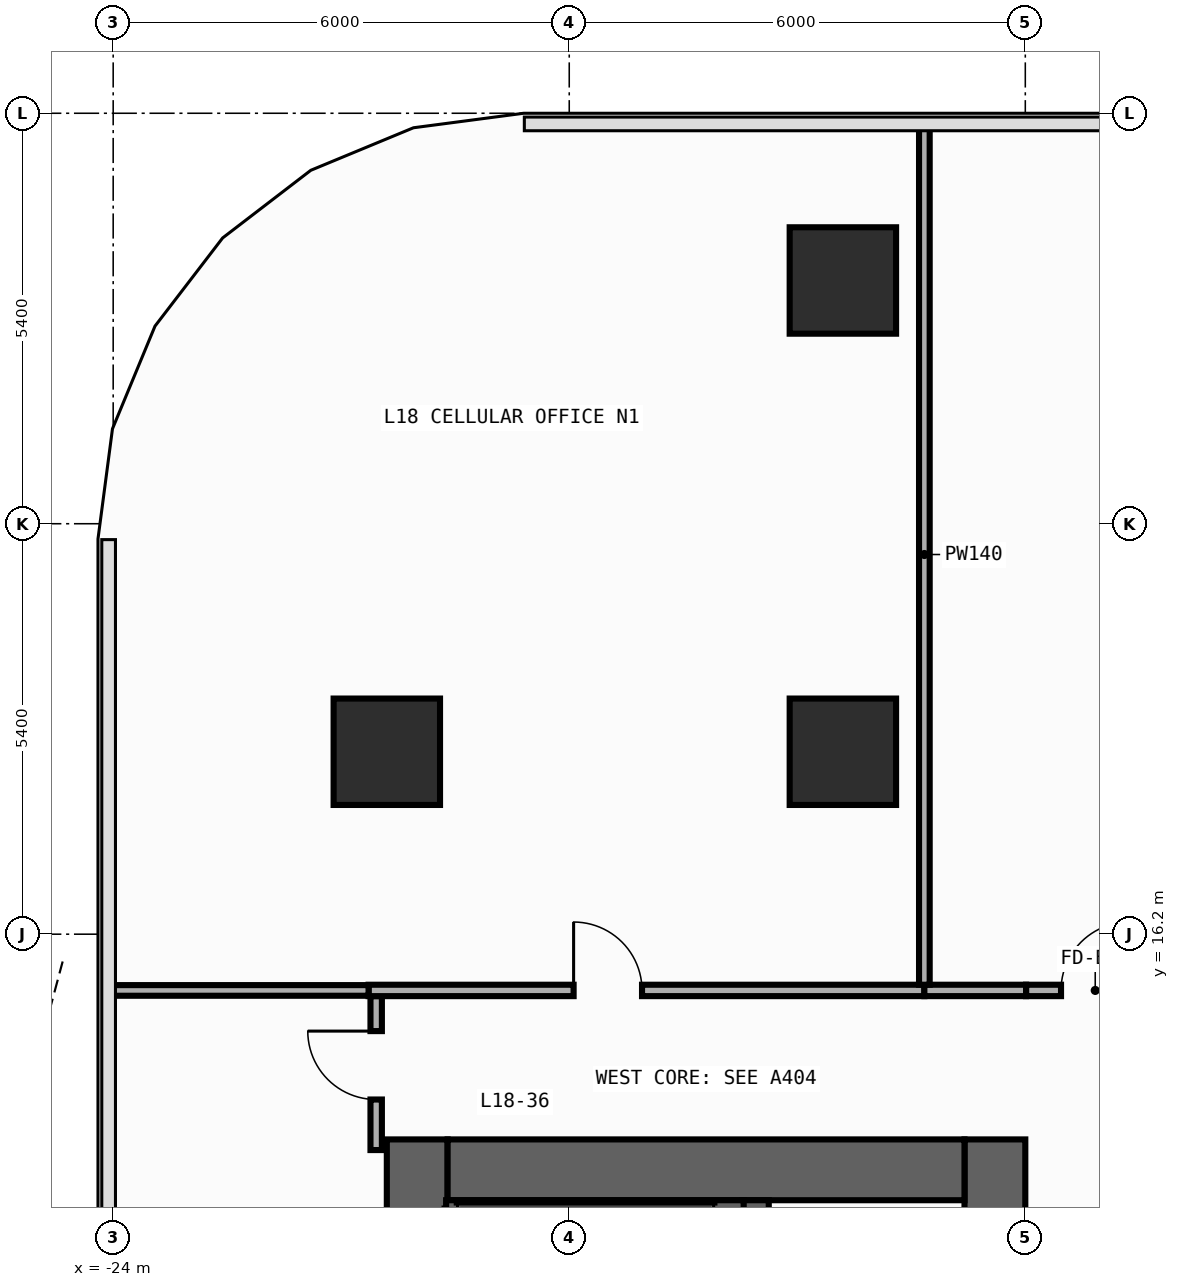
"""IFC4 building model, lengths in metres.
Left out: names, types, materials, properties, quantities, classifications, styles, units other than length and angle.
Written with IfcOpenShell. Run it as: python <this file> out.ifc"""

import sys

from ifc_helpers import new_model, si_unit, direction, frame, frame_2d, origin, origin_2d, place, context, subcontext, project, spatial, rectangle, extrude, element, fill, save


model = new_model("IFC4")
c1 = context("Model", 3, precision=1e-05, world=origin(), true_north=direction((0.0, 1.0)))
c2 = subcontext(c1, "Body", "Model", "MODEL_VIEW")
j1 = project(units=[si_unit("LENGTHUNIT", "METRE"), si_unit("PLANEANGLEUNIT", "RADIAN")], contexts=[c1])
p1 = place(None, origin())
s1 = spatial("IfcSite", under=j1, at=p1, CompositionType="ELEMENT")
p2 = place(p1, origin())
s2 = spatial("IfcBuilding", under=s1, at=p2, CompositionType="ELEMENT")
p3 = place(p2, frame((0.0, 0.0, 76.4)))
s3 = spatial("IfcBuildingStorey", under=s2, at=p3, CompositionType="ELEMENT", Elevation=76.4)
p4 = place(p3, frame((-20.0, -13.5, 0.0), z_axis=(0.0, 0.0, 1.0), x_axis=(0.0, 1.0, 0.0)))
e1 = element("IfcWall", 1, at=p4, inside=s3, PredefinedType="SHEAR", context=c2, shape_type="SweptSolid", body=[
    extrude(rectangle(XDim=27.0, YDim=0.8, at=frame_2d((13.5, 0.0))), origin(), (0.0, 0.0, 1.0), 3.94),
])
p5 = place(p3, frame((-12.4, -13.5, 0.0), z_axis=(0.0, 0.0, 1.0), x_axis=(0.0, 1.0, 0.0)))
e2 = element("IfcWall", 2, at=p5, inside=s3, PredefinedType="SHEAR", context=c2, shape_type="SweptSolid", body=[
    extrude(rectangle(XDim=27.0, YDim=0.8, at=frame_2d((13.5, 0.0))), origin(), (0.0, 0.0, 1.0), 3.94),
])
p6 = place(p5, frame((21.55, 0.0, 0.0)))
e3 = element("IfcOpeningElement", 3, at=p6, cuts=e2, PredefinedType="OPENING", context=c2, shape_type="SweptSolid", body=[
    extrude(rectangle(XDim=1.1, YDim=2.2, at=frame_2d((0.55, 1.1))), frame((0.0, 0.41, 0.0), z_axis=(0.0, -1.0, 0.0), x_axis=(1.0, 0.0, 0.0)), (0.0, 0.0, 1.0), 0.82),
])
p7 = place(p5, frame((18.35, 0.0, 0.0)))
e4 = element("IfcOpeningElement", 4, at=p7, cuts=e2, PredefinedType="OPENING", context=c2, shape_type="SweptSolid", body=[
    extrude(rectangle(XDim=1.1, YDim=2.2, at=frame_2d((0.55, 1.1))), frame((0.0, 0.41, 0.0), z_axis=(0.0, -1.0, 0.0), x_axis=(1.0, 0.0, 0.0)), (0.0, 0.0, 1.0), 0.82),
])
p8 = place(p5, frame((15.15, 0.0, 0.0)))
e5 = element("IfcOpeningElement", 5, at=p8, cuts=e2, PredefinedType="OPENING", context=c2, shape_type="SweptSolid", body=[
    extrude(rectangle(XDim=1.1, YDim=2.2, at=frame_2d((0.55, 1.1))), frame((0.0, 0.41, 0.0), z_axis=(0.0, -1.0, 0.0), x_axis=(1.0, 0.0, 0.0)), (0.0, 0.0, 1.0), 0.82),
])
p9 = place(p5, frame((10.35, 0.0, 0.0)))
e6 = element("IfcOpeningElement", 6, at=p9, cuts=e2, PredefinedType="OPENING", context=c2, shape_type="SweptSolid", body=[
    extrude(rectangle(XDim=1.1, YDim=2.2, at=frame_2d((0.55, 1.1))), frame((0.0, 0.41, 0.0), z_axis=(0.0, -1.0, 0.0), x_axis=(1.0, 0.0, 0.0)), (0.0, 0.0, 1.0), 0.82),
])
p10 = place(p5, frame((7.15, 0.0, 0.0)))
e7 = element("IfcOpeningElement", 7, at=p10, cuts=e2, PredefinedType="OPENING", context=c2, shape_type="SweptSolid", body=[
    extrude(rectangle(XDim=1.1, YDim=2.2, at=frame_2d((0.55, 1.1))), frame((0.0, 0.41, 0.0), z_axis=(0.0, -1.0, 0.0), x_axis=(1.0, 0.0, 0.0)), (0.0, 0.0, 1.0), 0.82),
])
p11 = place(p5, frame((3.95, 0.0, 0.0)))
e8 = element("IfcOpeningElement", 8, at=p11, cuts=e2, PredefinedType="OPENING", context=c2, shape_type="SweptSolid", body=[
    extrude(rectangle(XDim=1.1, YDim=2.2, at=frame_2d((0.55, 1.1))), frame((0.0, 0.41, 0.0), z_axis=(0.0, -1.0, 0.0), x_axis=(1.0, 0.0, 0.0)), (0.0, 0.0, 1.0), 0.82),
])
p12 = place(p5, frame((12.725, 0.0, 0.0)))
e9 = element("IfcOpeningElement", 9, at=p12, cuts=e2, PredefinedType="OPENING", context=c2, shape_type="SweptSolid", body=[
    extrude(rectangle(XDim=1.15, YDim=2.2, at=frame_2d((0.575, 1.1))), frame((0.0, 0.41, 0.0), z_axis=(0.0, -1.0, 0.0), x_axis=(1.0, 0.0, 0.0)), (0.0, 0.0, 1.0), 0.82),
])
p13 = place(p5, frame((1.625, 0.0, 0.0)))
e10 = element("IfcOpeningElement", 10, at=p13, cuts=e2, PredefinedType="OPENING", context=c2, shape_type="SweptSolid", body=[
    extrude(rectangle(XDim=0.85, YDim=2.1, at=frame_2d((0.425, 1.05))), frame((0.0, 0.41, 0.0), z_axis=(0.0, -1.0, 0.0), x_axis=(1.0, 0.0, 0.0)), (0.0, 0.0, 1.0), 0.82),
])
p14 = place(p3, frame((-19.6, 13.1, 0.0), z_axis=(0.0, 0.0, 1.0), x_axis=(1.0, 0.0, 0.0)))
e11 = element("IfcWall", 11, at=p14, inside=s3, PredefinedType="SHEAR", context=c2, shape_type="SweptSolid", body=[
    extrude(rectangle(XDim=6.8, YDim=0.8, at=frame_2d((3.4, 0.0))), origin(), (0.0, 0.0, 1.0), 3.94),
])
p15 = place(p3, frame((-15.55, -12.7, 0.0), z_axis=(0.0, 0.0, 1.0), x_axis=(0.0, 1.0, 0.0)))
e12 = element("IfcWall", 12, at=p15, inside=s3, PredefinedType="SHEAR", context=c2, shape_type="SweptSolid", body=[
    extrude(rectangle(XDim=25.4, YDim=0.35, at=frame_2d((12.7, 0.0))), origin(), (0.0, 0.0, 1.0), 3.94),
])
p16 = place(p15, frame((11.925, 0.0, 0.0)))
e13 = element("IfcOpeningElement", 13, at=p16, cuts=e12, PredefinedType="OPENING", context=c2, shape_type="SweptSolid", body=[
    extrude(rectangle(XDim=1.15, YDim=2.2, at=frame_2d((0.575, 1.1))), frame((0.0, 0.185, 0.0), z_axis=(0.0, -1.0, 0.0), x_axis=(1.0, 0.0, 0.0)), (0.0, 0.0, 1.0), 0.37),
])
p17 = place(p15, frame((0.825, 0.0, 0.0)))
e14 = element("IfcOpeningElement", 14, at=p17, cuts=e12, PredefinedType="OPENING", context=c2, shape_type="SweptSolid", body=[
    extrude(rectangle(XDim=0.85, YDim=2.1, at=frame_2d((0.425, 1.05))), frame((0.0, 0.185, 0.0), z_axis=(0.0, -1.0, 0.0), x_axis=(1.0, 0.0, 0.0)), (0.0, 0.0, 1.0), 0.37),
])
p18 = place(p3, frame((-19.62, 12.59, 0.0), z_axis=(0.0, 0.0, 1.0), x_axis=(1.0, 0.0, 0.0)))
e15 = element("IfcWall", 15, at=p18, inside=s3, PredefinedType="SHEAR", context=c2, shape_type="SweptSolid", body=[
    extrude(rectangle(XDim=3.915, YDim=0.22, at=frame_2d((1.958, 0.0))), origin(), (0.0, 0.0, 1.0), 3.94),
])
for number, where, z_axis, x_axis in (
    (16, (-20.4, 18.6, 0.0), (0.0, 0.0, 1.0), (1.0, 0.0, 0.0)),
    (17, (-14.4, 18.6, 0.0), (0.0, 0.0, 1.0), (1.0, 0.0, 0.0)),
    (18, (-14.4, 24.8, 0.0), (0.0, 0.0, 1.0), (1.0, 0.0, 0.0)),
):
    element("IfcColumn", number, at=place(p3, frame(where, z_axis=z_axis, x_axis=x_axis)), inside=s3, PredefinedType="COLUMN", context=c2, shape_type="SweptSolid", body=[
        extrude(rectangle(XDim=1.4, YDim=1.4, at=origin_2d()), origin(), (0.0, 0.0, 1.0), 4.2),
    ])
p19 = place(p3, frame((-11.99, 15.46, 0.0), z_axis=(0.0, 0.0, 1.0), x_axis=(1.0, 0.0, 0.0)))
e19 = element("IfcWall", 19, at=p19, inside=s3, PredefinedType="PARTITIONING", context=c2, shape_type="SweptSolid", body=[
    extrude(rectangle(XDim=1.98, YDim=0.15, at=frame_2d((0.99, 0.0))), origin(), (0.0, 0.0, 1.0), 3.94),
])
p20 = place(p19, frame((0.46, 0.0, 0.0)))
e20 = element("IfcOpeningElement", 20, at=p20, cuts=e19, PredefinedType="OPENING", context=c2, shape_type="SweptSolid", body=[
    extrude(rectangle(XDim=0.9, YDim=2.15, at=frame_2d((0.45, 1.075))), frame((0.0, 0.085, 0.0), z_axis=(0.0, -1.0, 0.0), x_axis=(1.0, 0.0, 0.0)), (0.0, 0.0, 1.0), 0.17),
])
p21 = place(p3, frame((-20.54, 13.36, 0.0), z_axis=(0.0, 0.0, 1.0), x_axis=(0.0, 1.0, 0.0)))
e21 = element("IfcWall", 21, at=p21, inside=s3, PredefinedType="PARTITIONING", context=c2, shape_type="SweptSolid", body=[
    extrude(rectangle(XDim=2.025, YDim=0.15, at=frame_2d((1.012, 0.0))), origin(), (0.0, 0.0, 1.0), 3.94),
])
p22 = place(p21, frame((0.665, 0.0, 0.0)))
e22 = element("IfcOpeningElement", 22, at=p22, cuts=e21, PredefinedType="OPENING", context=c2, shape_type="SweptSolid", body=[
    extrude(rectangle(XDim=0.9, YDim=2.15, at=frame_2d((0.45, 1.075))), frame((0.0, 0.085, 0.0), z_axis=(0.0, -1.0, 0.0), x_axis=(1.0, 0.0, 0.0)), (0.0, 0.0, 1.0), 0.17),
])
p23 = place(p3, frame((-20.64, 15.46, 0.0), z_axis=(0.0, 0.0, 1.0), x_axis=(1.0, 0.0, 0.0)))
e23 = element("IfcWall", 23, at=p23, inside=s3, PredefinedType="PARTITIONING", context=c2, shape_type="SweptSolid", body=[
    extrude(rectangle(XDim=7.312, YDim=0.15, at=frame_2d((3.656, 0.0))), origin(), (0.0, 0.0, 1.0), 3.94),
])
p24 = place(p23, frame((2.698, 0.0, 0.0)))
e24 = element("IfcOpeningElement", 24, at=p24, cuts=e23, PredefinedType="OPENING", context=c2, shape_type="SweptSolid", body=[
    extrude(rectangle(XDim=0.9, YDim=2.15, at=frame_2d((0.45, 1.075))), frame((0.0, 0.085, 0.0), z_axis=(0.0, -1.0, 0.0), x_axis=(1.0, 0.0, 0.0)), (0.0, 0.0, 1.0), 0.17),
])
p25 = place(p3, frame((-13.328, 15.46, 0.0), z_axis=(0.0, 0.0, 1.0), x_axis=(1.0, 0.0, 0.0)))
e25 = element("IfcWall", 25, at=p25, inside=s3, PredefinedType="PARTITIONING", context=c2, shape_type="SweptSolid", body=[
    extrude(rectangle(XDim=1.338, YDim=0.15, at=frame_2d((0.669, 0.0))), origin(), (0.0, 0.0, 1.0), 3.94),
])
p26 = place(p3, frame((-24.055, 15.46, 0.0), z_axis=(0.0, 0.0, 1.0), x_axis=(1.0, 0.0, 0.0)))
e26 = element("IfcWall", 26, at=p26, inside=s3, PredefinedType="PARTITIONING", context=c2, shape_type="SweptSolid", body=[
    extrude(rectangle(XDim=3.415, YDim=0.14, at=frame_2d((1.708, 0.0))), origin(), (0.0, 0.0, 1.0), 3.94),
])
p27 = place(p3, frame((-13.328, 15.535, 0.0), z_axis=(0.0, 0.0, 1.0), x_axis=(0.0, 1.0, 0.0)))
e27 = element("IfcWall", 27, at=p27, inside=s3, PredefinedType="PARTITIONING", context=c2, shape_type="SweptSolid", body=[
    extrude(rectangle(XDim=11.32, YDim=0.14, at=frame_2d((5.66, 0.0))), origin(), (0.0, 0.0, 1.0), 3.94),
])
p28 = place(p20, origin())
e28 = element("IfcDoor", 28, at=p28, inside=s3, OperationType="SINGLE_SWING_RIGHT", PredefinedType="DOOR", context=c2, shape_type="SweptSolid", body=[
    extrude(rectangle(XDim=0.9, YDim=2.15, at=frame_2d((0.45, 1.075))), frame((0.0, 0.025, 0.0), z_axis=(0.0, -1.0, 0.0), x_axis=(1.0, 0.0, 0.0)), (0.0, 0.0, 1.0), 0.05),
])
fill(e20, e28)
p29 = place(p22, origin())
e29 = element("IfcDoor", 29, at=p29, inside=s3, OperationType="SINGLE_SWING_RIGHT", PredefinedType="DOOR", context=c2, shape_type="SweptSolid", body=[
    extrude(rectangle(XDim=0.9, YDim=2.15, at=frame_2d((0.45, 1.075))), frame((0.0, 0.025, 0.0), z_axis=(0.0, -1.0, 0.0), x_axis=(1.0, 0.0, 0.0)), (0.0, 0.0, 1.0), 0.05),
])
fill(e22, e29)
p30 = place(p24, origin())
e30 = element("IfcDoor", 30, at=p30, inside=s3, OperationType="SINGLE_SWING_LEFT", PredefinedType="DOOR", context=c2, shape_type="SweptSolid", body=[
    extrude(rectangle(XDim=0.9, YDim=2.15, at=frame_2d((0.45, 1.075))), frame((0.0, 0.025, 0.0), z_axis=(0.0, -1.0, 0.0), x_axis=(1.0, 0.0, 0.0)), (0.0, 0.0, 1.0), 0.05),
])
fill(e24, e30)
save(model, sys.argv[1])
